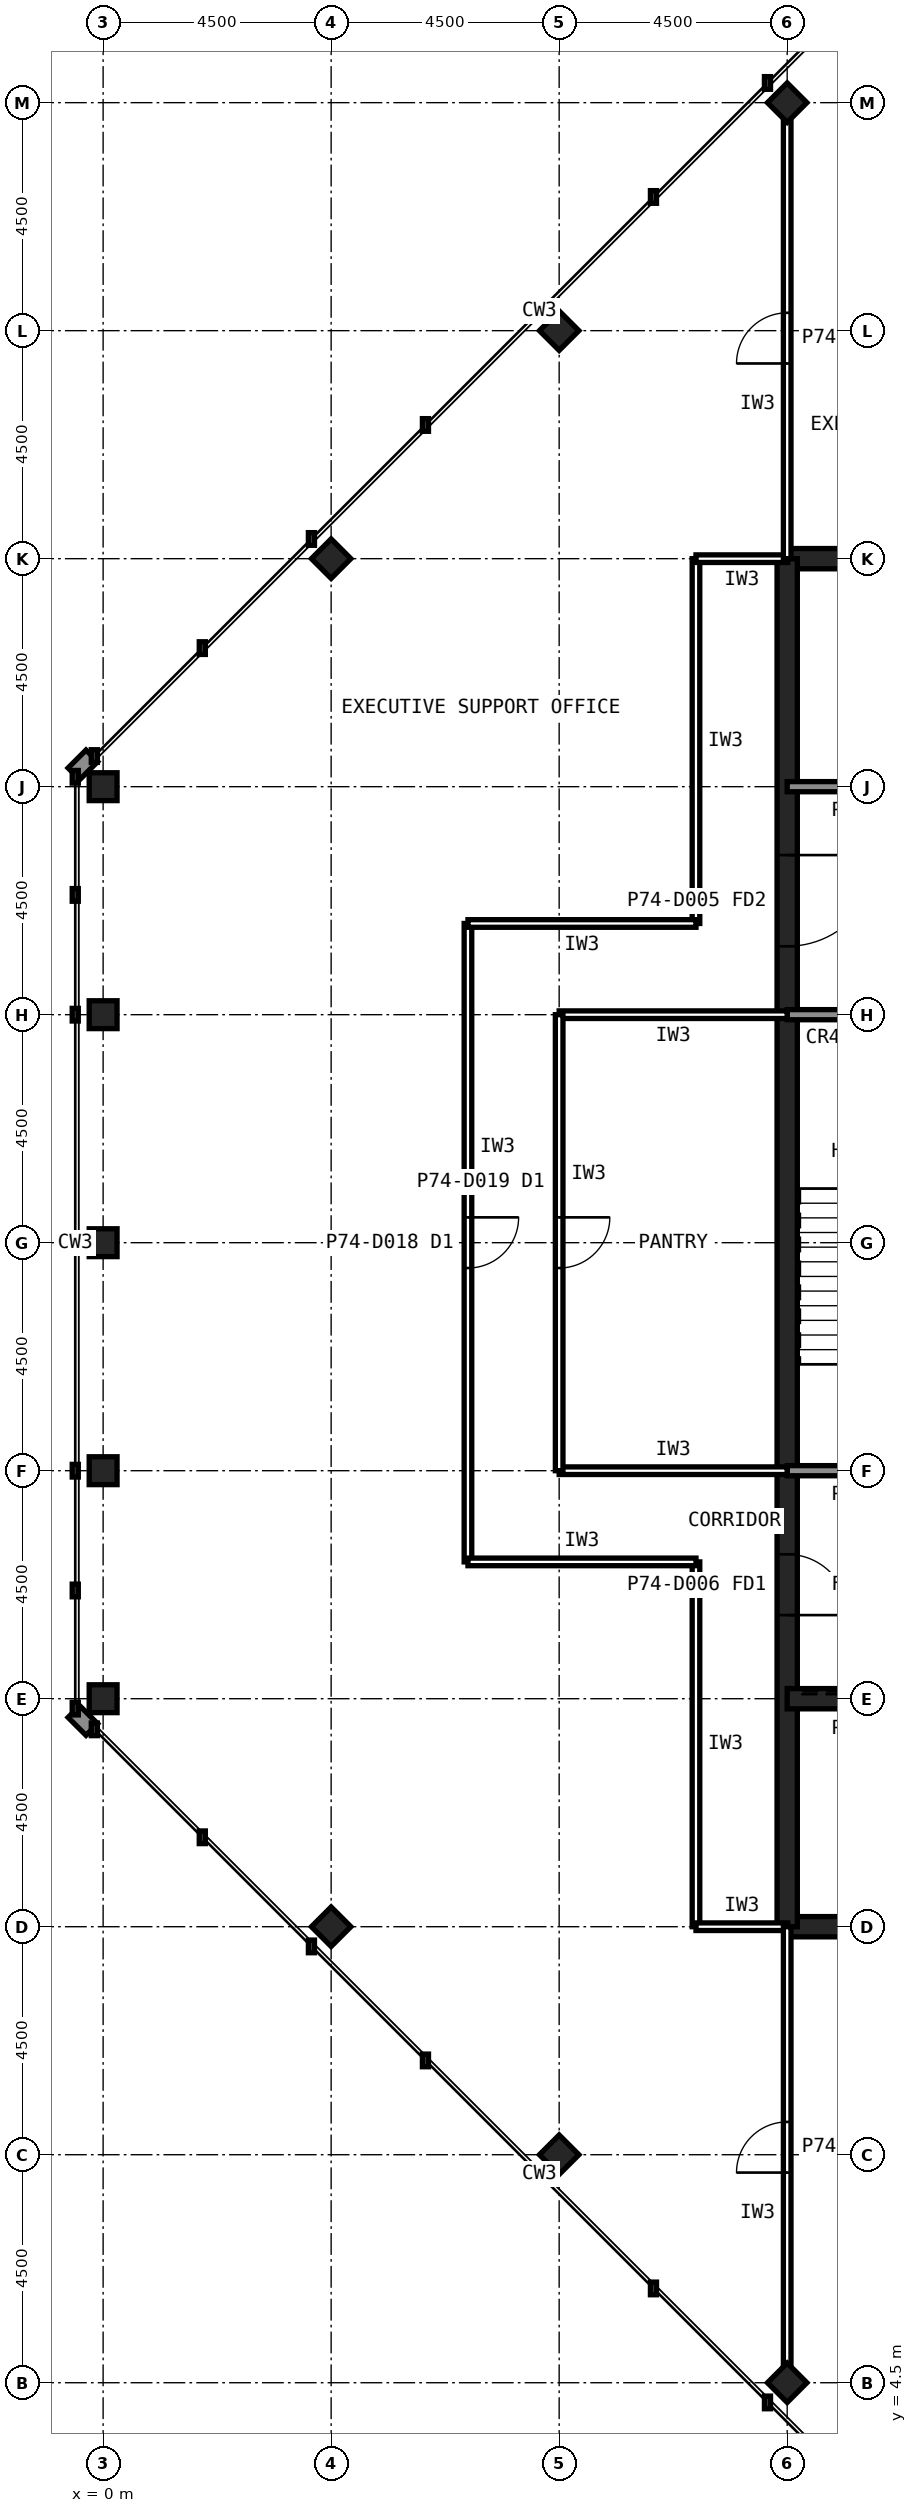
"""IFC4 building model, lengths in metres.
Left out: names, types, materials, properties, quantities, classifications, styles, units other than length and angle.
Written with IfcOpenShell. Run it as: python <this file> out.ifc"""

import sys

from ifc_helpers import new_model, si_unit, direction, frame, frame_2d, origin, origin_2d, place, context, subcontext, project, spatial, rectangle, hollow_rectangle, extrude, element, fill, save


model = new_model("IFC4")
c1 = context("Model", 3, precision=1e-05, world=origin(), true_north=direction((0.0, 1.0)))
c2 = subcontext(c1, "Body", "Model", "MODEL_VIEW")
j1 = project(units=[si_unit("LENGTHUNIT", "METRE"), si_unit("PLANEANGLEUNIT", "RADIAN")], contexts=[c1])
p1 = place(None, origin())
s1 = spatial("IfcSite", under=j1, at=p1, CompositionType="ELEMENT")
p2 = place(p1, origin())
s2 = spatial("IfcBuilding", under=s1, at=p2, CompositionType="ELEMENT")
p3 = place(p2, frame((0.0, 0.0, 310.6)))
s3 = spatial("IfcBuildingStorey", under=s2, at=p3, CompositionType="ELEMENT", Elevation=310.6)
for number, where, z_axis, x_axis in (
    (1, (0.0, 36.0, 0.0), (0.0, 0.0, 1.0), (1.0, 0.0, 0.0)),
    (2, (0.0, 31.5, 0.0), (0.0, 0.0, 1.0), (1.0, 0.0, 0.0)),
    (3, (0.0, 27.0, 0.0), (0.0, 0.0, 1.0), (1.0, 0.0, 0.0)),
    (4, (0.0, 22.5, 0.0), (0.0, 0.0, 1.0), (1.0, 0.0, 0.0)),
    (5, (0.0, 18.0, 0.0), (0.0, 0.0, 1.0), (1.0, 0.0, 0.0)),
    (6, (13.5, 4.5, 0.0), (0.0, 0.0, 1.0), (0.707, 0.707, 0.0)),
    (7, (9.0, 9.0, 0.0), (0.0, 0.0, 1.0), (0.707, 0.707, 0.0)),
    (8, (4.5, 13.5, 0.0), (0.0, 0.0, 1.0), (0.707, 0.707, 0.0)),
    (9, (4.5, 40.5, 0.0), (0.0, 0.0, 1.0), (0.707, 0.707, 0.0)),
    (10, (9.0, 45.0, 0.0), (0.0, 0.0, 1.0), (0.707, 0.707, 0.0)),
    (11, (13.5, 49.5, 0.0), (0.0, 0.0, 1.0), (0.707, 0.707, 0.0)),
):
    element("IfcColumn", number, at=place(p3, frame(where, z_axis=z_axis, x_axis=x_axis)), inside=s3, PredefinedType="COLUMN", context=c2, shape_type="SweptSolid", body=[
        extrude(hollow_rectangle(XDim=0.55, YDim=0.55, WallThickness=0.025, at=origin_2d()), origin(), (0.0, 0.0, 1.0), 4.5),
    ])
for number, where, z_axis, x_axis in (
    (12, (13.5, 13.5, 0.0), (0.0, 0.0, 1.0), (1.0, 0.0, 0.0)),
    (13, (40.5, 40.5, 0.0), (0.0, 0.0, 1.0), (-1.0, 0.0, 0.0)),
):
    element("IfcWall", number, at=place(p3, frame(where, z_axis=z_axis, x_axis=x_axis)), inside=s3, PredefinedType="SHEAR", context=c2, shape_type="SweptSolid", body=[
        extrude(rectangle(XDim=27.0, YDim=0.4, at=frame_2d((13.5, 0.0))), origin(), (0.0, 0.0, 1.0), 4.5),
    ])
p4 = place(p3, frame((13.5, 40.5, 0.0), z_axis=(0.0, 0.0, 1.0), x_axis=(0.0, -1.0, 0.0)))
e14 = element("IfcWall", 14, at=p4, inside=s3, PredefinedType="SHEAR", context=c2, shape_type="SweptSolid", body=[
    extrude(rectangle(XDim=27.0, YDim=0.4, at=frame_2d((13.5, 0.0))), origin(), (0.0, 0.0, 1.0), 4.5),
])
p5 = place(p4, frame((19.65, 0.0, 0.0)))
e15 = element("IfcOpeningElement", 15, at=p5, cuts=e14, PredefinedType="OPENING", context=c2, shape_type="SweptSolid", body=[
    extrude(rectangle(XDim=1.2, YDim=2.1, at=frame_2d((0.6, 1.05))), frame((0.0, 0.21, 0.0), z_axis=(0.0, -1.0, 0.0), x_axis=(1.0, 0.0, 0.0)), (0.0, 0.0, 1.0), 0.42),
])
p6 = place(p4, frame((5.85, 0.0, 0.0)))
e16 = element("IfcOpeningElement", 16, at=p6, cuts=e14, PredefinedType="OPENING", context=c2, shape_type="SweptSolid", body=[
    extrude(rectangle(XDim=1.8, YDim=2.1, at=frame_2d((0.9, 1.05))), frame((0.0, 0.21, 0.0), z_axis=(0.0, -1.0, 0.0), x_axis=(1.0, 0.0, 0.0)), (0.0, 0.0, 1.0), 0.42),
])
p7 = place(p3, frame((13.5, 18.0, 0.0), z_axis=(0.0, 0.0, 1.0), x_axis=(1.0, 0.0, 0.0)))
e17 = element("IfcWall", 17, at=p7, inside=s3, PredefinedType="SHEAR", context=c2, shape_type="SweptSolid", body=[
    extrude(rectangle(XDim=27.0, YDim=0.4, at=frame_2d((13.5, 0.0))), origin(), (0.0, 0.0, 1.0), 4.5),
])
p8 = place(p7, frame((24.3, 0.0, 0.0)))
e18 = element("IfcOpeningElement", 18, at=p8, cuts=e17, PredefinedType="OPENING", context=c2, shape_type="SweptSolid", body=[
    extrude(rectangle(XDim=0.9, YDim=2.1, at=frame_2d((0.45, 1.05))), frame((0.0, 0.21, 0.0), z_axis=(0.0, -1.0, 0.0), x_axis=(1.0, 0.0, 0.0)), (0.0, 0.0, 1.0), 0.42),
])
p9 = place(p7, frame((5.45, 0.0, 0.0)))
e19 = element("IfcOpeningElement", 19, at=p9, cuts=e17, PredefinedType="OPENING", context=c2, shape_type="SweptSolid", body=[
    extrude(rectangle(XDim=1.1, YDim=2.1, at=frame_2d((0.55, 1.05))), frame((0.0, 0.21, 0.0), z_axis=(0.0, -1.0, 0.0), x_axis=(1.0, 0.0, 0.0)), (0.0, 0.0, 1.0), 0.42),
])
p10 = place(p7, frame((8.45, 0.0, 0.0)))
e20 = element("IfcOpeningElement", 20, at=p10, cuts=e17, PredefinedType="OPENING", context=c2, shape_type="SweptSolid", body=[
    extrude(rectangle(XDim=1.1, YDim=2.1, at=frame_2d((0.55, 1.05))), frame((0.0, 0.21, 0.0), z_axis=(0.0, -1.0, 0.0), x_axis=(1.0, 0.0, 0.0)), (0.0, 0.0, 1.0), 0.42),
])
p11 = place(p7, frame((11.45, 0.0, 0.0)))
e21 = element("IfcOpeningElement", 21, at=p11, cuts=e17, PredefinedType="OPENING", context=c2, shape_type="SweptSolid", body=[
    extrude(rectangle(XDim=1.1, YDim=2.1, at=frame_2d((0.55, 1.05))), frame((0.0, 0.21, 0.0), z_axis=(0.0, -1.0, 0.0), x_axis=(1.0, 0.0, 0.0)), (0.0, 0.0, 1.0), 0.42),
])
p12 = place(p7, frame((14.45, 0.0, 0.0)))
e22 = element("IfcOpeningElement", 22, at=p12, cuts=e17, PredefinedType="OPENING", context=c2, shape_type="SweptSolid", body=[
    extrude(rectangle(XDim=1.1, YDim=2.1, at=frame_2d((0.55, 1.05))), frame((0.0, 0.21, 0.0), z_axis=(0.0, -1.0, 0.0), x_axis=(1.0, 0.0, 0.0)), (0.0, 0.0, 1.0), 0.42),
])
p13 = place(p7, frame((17.45, 0.0, 0.0)))
e23 = element("IfcOpeningElement", 23, at=p13, cuts=e17, PredefinedType="OPENING", context=c2, shape_type="SweptSolid", body=[
    extrude(rectangle(XDim=1.1, YDim=2.1, at=frame_2d((0.55, 1.05))), frame((0.0, 0.21, 0.0), z_axis=(0.0, -1.0, 0.0), x_axis=(1.0, 0.0, 0.0)), (0.0, 0.0, 1.0), 0.42),
])
p14 = place(p7, frame((20.45, 0.0, 0.0)))
e24 = element("IfcOpeningElement", 24, at=p14, cuts=e17, PredefinedType="OPENING", context=c2, shape_type="SweptSolid", body=[
    extrude(rectangle(XDim=1.1, YDim=2.1, at=frame_2d((0.55, 1.05))), frame((0.0, 0.21, 0.0), z_axis=(0.0, -1.0, 0.0), x_axis=(1.0, 0.0, 0.0)), (0.0, 0.0, 1.0), 0.42),
])
p15 = place(p7, frame((1.6, 0.0, 0.0)))
e25 = element("IfcOpeningElement", 25, at=p15, cuts=e17, PredefinedType="OPENING", context=c2, shape_type="SweptSolid", body=[
    extrude(rectangle(XDim=1.3, YDim=2.2, at=frame_2d((0.65, 1.1))), frame((0.0, 0.21, 0.0), z_axis=(0.0, -1.0, 0.0), x_axis=(1.0, 0.0, 0.0)), (0.0, 0.0, 1.0), 0.42),
])
p16 = place(p3, frame((13.5, 36.0, 0.0), z_axis=(0.0, 0.0, 1.0), x_axis=(1.0, 0.0, 0.0)))
e26 = element("IfcWall", 26, at=p16, inside=s3, PredefinedType="SOLIDWALL", context=c2, shape_type="SweptSolid", body=[
    extrude(rectangle(XDim=27.0, YDim=0.2, at=frame_2d((13.5, 0.0))), origin(), (0.0, 0.0, 1.0), 4.32),
])
p17 = place(p16, frame((1.8, 0.0, 0.0)))
e27 = element("IfcOpeningElement", 27, at=p17, cuts=e26, PredefinedType="OPENING", context=c2, shape_type="SweptSolid", body=[
    extrude(rectangle(XDim=0.9, YDim=2.1, at=frame_2d((0.45, 1.05))), frame((0.0, 0.11, 0.0), z_axis=(0.0, -1.0, 0.0), x_axis=(1.0, 0.0, 0.0)), (0.0, 0.0, 1.0), 0.22),
])
p18 = place(p16, frame((5.55, 0.0, 0.0)))
e28 = element("IfcOpeningElement", 28, at=p18, cuts=e26, PredefinedType="OPENING", context=c2, shape_type="SweptSolid", body=[
    extrude(rectangle(XDim=0.9, YDim=2.1, at=frame_2d((0.45, 1.05))), frame((0.0, 0.11, 0.0), z_axis=(0.0, -1.0, 0.0), x_axis=(1.0, 0.0, 0.0)), (0.0, 0.0, 1.0), 0.22),
])
p19 = place(p16, frame((11.55, 0.0, 0.0)))
e29 = element("IfcOpeningElement", 29, at=p19, cuts=e26, PredefinedType="OPENING", context=c2, shape_type="SweptSolid", body=[
    extrude(rectangle(XDim=0.9, YDim=2.1, at=frame_2d((0.45, 1.05))), frame((0.0, 0.11, 0.0), z_axis=(0.0, -1.0, 0.0), x_axis=(1.0, 0.0, 0.0)), (0.0, 0.0, 1.0), 0.22),
])
p20 = place(p16, frame((14.55, 0.0, 0.0)))
e30 = element("IfcOpeningElement", 30, at=p20, cuts=e26, PredefinedType="OPENING", context=c2, shape_type="SweptSolid", body=[
    extrude(rectangle(XDim=0.9, YDim=2.1, at=frame_2d((0.45, 1.05))), frame((0.0, 0.11, 0.0), z_axis=(0.0, -1.0, 0.0), x_axis=(1.0, 0.0, 0.0)), (0.0, 0.0, 1.0), 0.22),
])
p21 = place(p16, frame((20.55, 0.0, 0.0)))
e31 = element("IfcOpeningElement", 31, at=p21, cuts=e26, PredefinedType="OPENING", context=c2, shape_type="SweptSolid", body=[
    extrude(rectangle(XDim=0.9, YDim=2.1, at=frame_2d((0.45, 1.05))), frame((0.0, 0.11, 0.0), z_axis=(0.0, -1.0, 0.0), x_axis=(1.0, 0.0, 0.0)), (0.0, 0.0, 1.0), 0.22),
])
p22 = place(p16, frame((24.1, 0.0, 0.0)))
e32 = element("IfcOpeningElement", 32, at=p22, cuts=e26, PredefinedType="OPENING", context=c2, shape_type="SweptSolid", body=[
    extrude(rectangle(XDim=1.3, YDim=2.2, at=frame_2d((0.65, 1.1))), frame((0.0, 0.11, 0.0), z_axis=(0.0, -1.0, 0.0), x_axis=(1.0, 0.0, 0.0)), (0.0, 0.0, 1.0), 0.22),
])
p23 = place(p3, frame((13.5, 22.5, 0.0), z_axis=(0.0, 0.0, 1.0), x_axis=(1.0, 0.0, 0.0)))
e33 = element("IfcWall", 33, at=p23, inside=s3, PredefinedType="SOLIDWALL", context=c2, shape_type="SweptSolid", body=[
    extrude(rectangle(XDim=27.0, YDim=0.2, at=frame_2d((13.5, 0.0))), origin(), (0.0, 0.0, 1.0), 4.32),
])
p24 = place(p23, frame((1.65, 0.0, 0.0)))
e34 = element("IfcOpeningElement", 34, at=p24, cuts=e33, PredefinedType="OPENING", context=c2, shape_type="SweptSolid", body=[
    extrude(rectangle(XDim=1.2, YDim=2.1, at=frame_2d((0.6, 1.05))), frame((0.0, 0.11, 0.0), z_axis=(0.0, -1.0, 0.0), x_axis=(1.0, 0.0, 0.0)), (0.0, 0.0, 1.0), 0.22),
])
p25 = place(p23, frame((6.025, 0.0, 0.0)))
e35 = element("IfcOpeningElement", 35, at=p25, cuts=e33, PredefinedType="OPENING", context=c2, shape_type="SweptSolid", body=[
    extrude(rectangle(XDim=1.0, YDim=2.1, at=frame_2d((0.5, 1.05))), frame((0.0, 0.11, 0.0), z_axis=(0.0, -1.0, 0.0), x_axis=(1.0, 0.0, 0.0)), (0.0, 0.0, 1.0), 0.22),
])
p26 = place(p23, frame((10.525, 0.0, 0.0)))
e36 = element("IfcOpeningElement", 36, at=p26, cuts=e33, PredefinedType="OPENING", context=c2, shape_type="SweptSolid", body=[
    extrude(rectangle(XDim=1.0, YDim=2.1, at=frame_2d((0.5, 1.05))), frame((0.0, 0.11, 0.0), z_axis=(0.0, -1.0, 0.0), x_axis=(1.0, 0.0, 0.0)), (0.0, 0.0, 1.0), 0.22),
])
p27 = place(p23, frame((19.75, 0.0, 0.0)))
e37 = element("IfcOpeningElement", 37, at=p27, cuts=e33, PredefinedType="OPENING", context=c2, shape_type="SweptSolid", body=[
    extrude(rectangle(XDim=1.0, YDim=2.1, at=frame_2d((0.5, 1.05))), frame((0.0, 0.11, 0.0), z_axis=(0.0, -1.0, 0.0), x_axis=(1.0, 0.0, 0.0)), (0.0, 0.0, 1.0), 0.22),
])
p28 = place(p23, frame((15.05, 0.0, 0.0)))
e38 = element("IfcOpeningElement", 38, at=p28, cuts=e33, PredefinedType="OPENING", context=c2, shape_type="SweptSolid", body=[
    extrude(rectangle(XDim=1.4, YDim=2.4, at=frame_2d((0.7, 1.2))), frame((0.0, 0.11, 0.0), z_axis=(0.0, -1.0, 0.0), x_axis=(1.0, 0.0, 0.0)), (0.0, 0.0, 1.0), 0.22),
])
p29 = place(p3, frame((13.5, 31.5, 0.0), z_axis=(0.0, 0.0, 1.0), x_axis=(1.0, 0.0, 0.0)))
e39 = element("IfcWall", 39, at=p29, inside=s3, PredefinedType="SOLIDWALL", context=c2, shape_type="SweptSolid", body=[
    extrude(rectangle(XDim=27.0, YDim=0.2, at=frame_2d((13.5, 0.0))), origin(), (0.0, 0.0, 1.0), 4.32),
])
p30 = place(p29, frame((24.15, 0.0, 0.0)))
e40 = element("IfcOpeningElement", 40, at=p30, cuts=e39, PredefinedType="OPENING", context=c2, shape_type="SweptSolid", body=[
    extrude(rectangle(XDim=1.2, YDim=2.1, at=frame_2d((0.6, 1.05))), frame((0.0, 0.11, 0.0), z_axis=(0.0, -1.0, 0.0), x_axis=(1.0, 0.0, 0.0)), (0.0, 0.0, 1.0), 0.22),
])
p31 = place(p29, frame((15.3, 0.0, 0.0)))
e41 = element("IfcOpeningElement", 41, at=p31, cuts=e39, PredefinedType="OPENING", context=c2, shape_type="SweptSolid", body=[
    extrude(rectangle(XDim=0.9, YDim=2.1, at=frame_2d((0.45, 1.05))), frame((0.0, 0.11, 0.0), z_axis=(0.0, -1.0, 0.0), x_axis=(1.0, 0.0, 0.0)), (0.0, 0.0, 1.0), 0.22),
])
p32 = place(p29, frame((19.8, 0.0, 0.0)))
e42 = element("IfcOpeningElement", 42, at=p32, cuts=e39, PredefinedType="OPENING", context=c2, shape_type="SweptSolid", body=[
    extrude(rectangle(XDim=0.9, YDim=2.1, at=frame_2d((0.45, 1.05))), frame((0.0, 0.11, 0.0), z_axis=(0.0, -1.0, 0.0), x_axis=(1.0, 0.0, 0.0)), (0.0, 0.0, 1.0), 0.22),
])
p33 = place(p3, frame((7.2, 33.3, 0.0), z_axis=(0.0, 0.0, 1.0), x_axis=(0.0, -1.0, 0.0)))
e43 = element("IfcWall", 43, at=p33, inside=s3, PredefinedType="PARTITIONING", context=c2, shape_type="SweptSolid", body=[
    extrude(rectangle(XDim=12.6, YDim=0.15, at=frame_2d((6.3, 0.0))), origin(), (0.0, 0.0, 1.0), 4.32),
])
p34 = place(p33, frame((5.8, 0.0, 0.0)))
e44 = element("IfcOpeningElement", 44, at=p34, cuts=e43, PredefinedType="OPENING", context=c2, shape_type="SweptSolid", body=[
    extrude(rectangle(XDim=1.0, YDim=2.1, at=frame_2d((0.5, 1.05))), frame((0.0, 0.085, 0.0), z_axis=(0.0, -1.0, 0.0), x_axis=(1.0, 0.0, 0.0)), (0.0, 0.0, 1.0), 0.17),
])
for number, where, z_axis, x_axis in (
    (45, (11.7, 20.7, 0.0), (0.0, 0.0, 1.0), (0.0, -1.0, 0.0)),
    (46, (11.7, 40.5, 0.0), (0.0, 0.0, 1.0), (0.0, -1.0, 0.0)),
):
    element("IfcWall", number, at=place(p3, frame(where, z_axis=z_axis, x_axis=x_axis)), inside=s3, PredefinedType="PARTITIONING", context=c2, shape_type="SweptSolid", body=[
        extrude(rectangle(XDim=7.2, YDim=0.15, at=frame_2d((3.6, 0.0))), origin(), (0.0, 0.0, 1.0), 4.32),
    ])
for number, where, z_axis, x_axis in (
    (47, (7.2, 20.7, 0.0), (0.0, 0.0, 1.0), (1.0, 0.0, 0.0)),
    (48, (11.7, 33.3, 0.0), (0.0, 0.0, 1.0), (-1.0, 0.0, 0.0)),
):
    element("IfcWall", number, at=place(p3, frame(where, z_axis=z_axis, x_axis=x_axis)), inside=s3, PredefinedType="PARTITIONING", context=c2, shape_type="SweptSolid", body=[
        extrude(rectangle(XDim=4.5, YDim=0.15, at=frame_2d((2.25, 0.0))), origin(), (0.0, 0.0, 1.0), 4.32),
    ])
for number, where, z_axis, x_axis in (
    (49, (11.7, 13.5, 0.0), (0.0, 0.0, 1.0), (1.0, 0.0, 0.0)),
    (50, (13.51, 40.5, 0.0), (0.0, 0.0, 1.0), (-1.0, 0.0, 0.0)),
):
    element("IfcWall", number, at=place(p3, frame(where, z_axis=z_axis, x_axis=x_axis)), inside=s3, PredefinedType="PARTITIONING", context=c2, shape_type="SweptSolid", body=[
        extrude(rectangle(XDim=1.81, YDim=0.15, at=frame_2d((0.905, 0.0))), origin(), (0.0, 0.0, 1.0), 3.393),
    ])
for number, where, z_axis, x_axis in (
    (51, (9.0, 22.5, 0.0), (0.0, 0.0, 1.0), (1.0, 0.0, 0.0)),
    (52, (13.5, 31.5, 0.0), (0.0, 0.0, 1.0), (-1.0, 0.0, 0.0)),
):
    element("IfcWall", number, at=place(p3, frame(where, z_axis=z_axis, x_axis=x_axis)), inside=s3, PredefinedType="PARTITIONING", context=c2, shape_type="SweptSolid", body=[
        extrude(rectangle(XDim=4.5, YDim=0.15, at=frame_2d((2.25, 0.0))), origin(), (0.0, 0.0, 1.0), 3.393),
    ])
p35 = place(p3, frame((9.0, 31.5, 0.0), z_axis=(0.0, 0.0, 1.0), x_axis=(0.0, -1.0, 0.0)))
e53 = element("IfcWall", 53, at=p35, inside=s3, PredefinedType="PARTITIONING", context=c2, shape_type="SweptSolid", body=[
    extrude(rectangle(XDim=9.0, YDim=0.15, at=frame_2d((4.5, 0.0))), origin(), (0.0, 0.0, 1.0), 4.32),
])
p36 = place(p35, frame((4.0, 0.0, 0.0)))
e54 = element("IfcOpeningElement", 54, at=p36, cuts=e53, PredefinedType="OPENING", context=c2, shape_type="SweptSolid", body=[
    extrude(rectangle(XDim=1.0, YDim=2.1, at=frame_2d((0.5, 1.05))), frame((0.0, 0.085, 0.0), z_axis=(0.0, -1.0, 0.0), x_axis=(1.0, 0.0, 0.0)), (0.0, 0.0, 1.0), 0.17),
])
p37 = place(p3, frame((13.5, 40.5, 0.0), z_axis=(0.0, 0.0, 1.0), x_axis=(0.0, 1.0, 0.0)))
e55 = element("IfcWall", 55, at=p37, inside=s3, PredefinedType="PARTITIONING", context=c2, shape_type="SweptSolid", body=[
    extrude(rectangle(XDim=8.705, YDim=0.15, at=frame_2d((4.353, 0.0))), origin(), (0.0, 0.0, 1.0), 3.393),
])
p38 = place(p37, frame((3.853, 0.0, 0.0)))
e56 = element("IfcOpeningElement", 56, at=p38, cuts=e55, PredefinedType="OPENING", context=c2, shape_type="SweptSolid", body=[
    extrude(rectangle(XDim=1.0, YDim=2.1, at=frame_2d((0.5, 1.05))), frame((0.0, 0.085, 0.0), z_axis=(0.0, -1.0, 0.0), x_axis=(1.0, 0.0, 0.0)), (0.0, 0.0, 1.0), 0.17),
])
p39 = place(p3, frame((13.5, 4.795, 0.0), z_axis=(0.0, 0.0, 1.0), x_axis=(0.0, 1.0, 0.0)))
e57 = element("IfcWall", 57, at=p39, inside=s3, PredefinedType="PARTITIONING", context=c2, shape_type="SweptSolid", body=[
    extrude(rectangle(XDim=8.705, YDim=0.15, at=frame_2d((4.353, 0.0))), origin(), (0.0, 0.0, 1.0), 3.393),
])
p40 = place(p39, frame((3.853, 0.0, 0.0)))
e58 = element("IfcOpeningElement", 58, at=p40, cuts=e57, PredefinedType="OPENING", context=c2, shape_type="SweptSolid", body=[
    extrude(rectangle(XDim=1.0, YDim=2.1, at=frame_2d((0.5, 1.05))), frame((0.0, 0.085, 0.0), z_axis=(0.0, -1.0, 0.0), x_axis=(1.0, 0.0, 0.0)), (0.0, 0.0, 1.0), 0.17),
])
p41 = place(p5, origin())
e59 = element("IfcDoor", 59, at=p41, inside=s3, OperationType="SINGLE_SWING_RIGHT", PredefinedType="DOOR", context=c2, shape_type="SweptSolid", body=[
    extrude(rectangle(XDim=1.2, YDim=2.1, at=frame_2d((0.6, 1.05))), frame((0.0, 0.025, 0.0), z_axis=(0.0, -1.0, 0.0), x_axis=(1.0, 0.0, 0.0)), (0.0, 0.0, 1.0), 0.05),
])
fill(e15, e59)
p42 = place(p6, origin())
e60 = element("IfcDoor", 60, at=p42, inside=s3, OperationType="SINGLE_SWING_LEFT", PredefinedType="DOOR", context=c2, shape_type="SweptSolid", body=[
    extrude(rectangle(XDim=1.8, YDim=2.1, at=frame_2d((0.9, 1.05))), frame((0.0, 0.025, 0.0), z_axis=(0.0, -1.0, 0.0), x_axis=(1.0, 0.0, 0.0)), (0.0, 0.0, 1.0), 0.05),
])
fill(e16, e60)
p43 = place(p34, origin())
e61 = element("IfcDoor", 61, at=p43, inside=s3, OperationType="SINGLE_SWING_LEFT", PredefinedType="DOOR", context=c2, shape_type="SweptSolid", body=[
    extrude(rectangle(XDim=1.0, YDim=2.1, at=frame_2d((0.5, 1.05))), frame((0.0, 0.025, 0.0), z_axis=(0.0, -1.0, 0.0), x_axis=(1.0, 0.0, 0.0)), (0.0, 0.0, 1.0), 0.05),
])
fill(e44, e61)
p44 = place(p36, origin())
e62 = element("IfcDoor", 62, at=p44, inside=s3, OperationType="SINGLE_SWING_LEFT", PredefinedType="DOOR", context=c2, shape_type="SweptSolid", body=[
    extrude(rectangle(XDim=1.0, YDim=2.1, at=frame_2d((0.5, 1.05))), frame((0.0, 0.025, 0.0), z_axis=(0.0, -1.0, 0.0), x_axis=(1.0, 0.0, 0.0)), (0.0, 0.0, 1.0), 0.05),
])
fill(e54, e62)
p45 = place(p38, origin())
e63 = element("IfcDoor", 63, at=p45, inside=s3, OperationType="SINGLE_SWING_LEFT", PredefinedType="DOOR", context=c2, shape_type="SweptSolid", body=[
    extrude(rectangle(XDim=1.0, YDim=2.1, at=frame_2d((0.5, 1.05))), frame((0.0, 0.025, 0.0), z_axis=(0.0, -1.0, 0.0), x_axis=(1.0, 0.0, 0.0)), (0.0, 0.0, 1.0), 0.05),
])
fill(e56, e63)
p46 = place(p40, origin())
e64 = element("IfcDoor", 64, at=p46, inside=s3, OperationType="SINGLE_SWING_LEFT", PredefinedType="DOOR", context=c2, shape_type="SweptSolid", body=[
    extrude(rectangle(XDim=1.0, YDim=2.1, at=frame_2d((0.5, 1.05))), frame((0.0, 0.025, 0.0), z_axis=(0.0, -1.0, 0.0), x_axis=(1.0, 0.0, 0.0)), (0.0, 0.0, 1.0), 0.05),
])
fill(e58, e64)
save(model, sys.argv[1])
